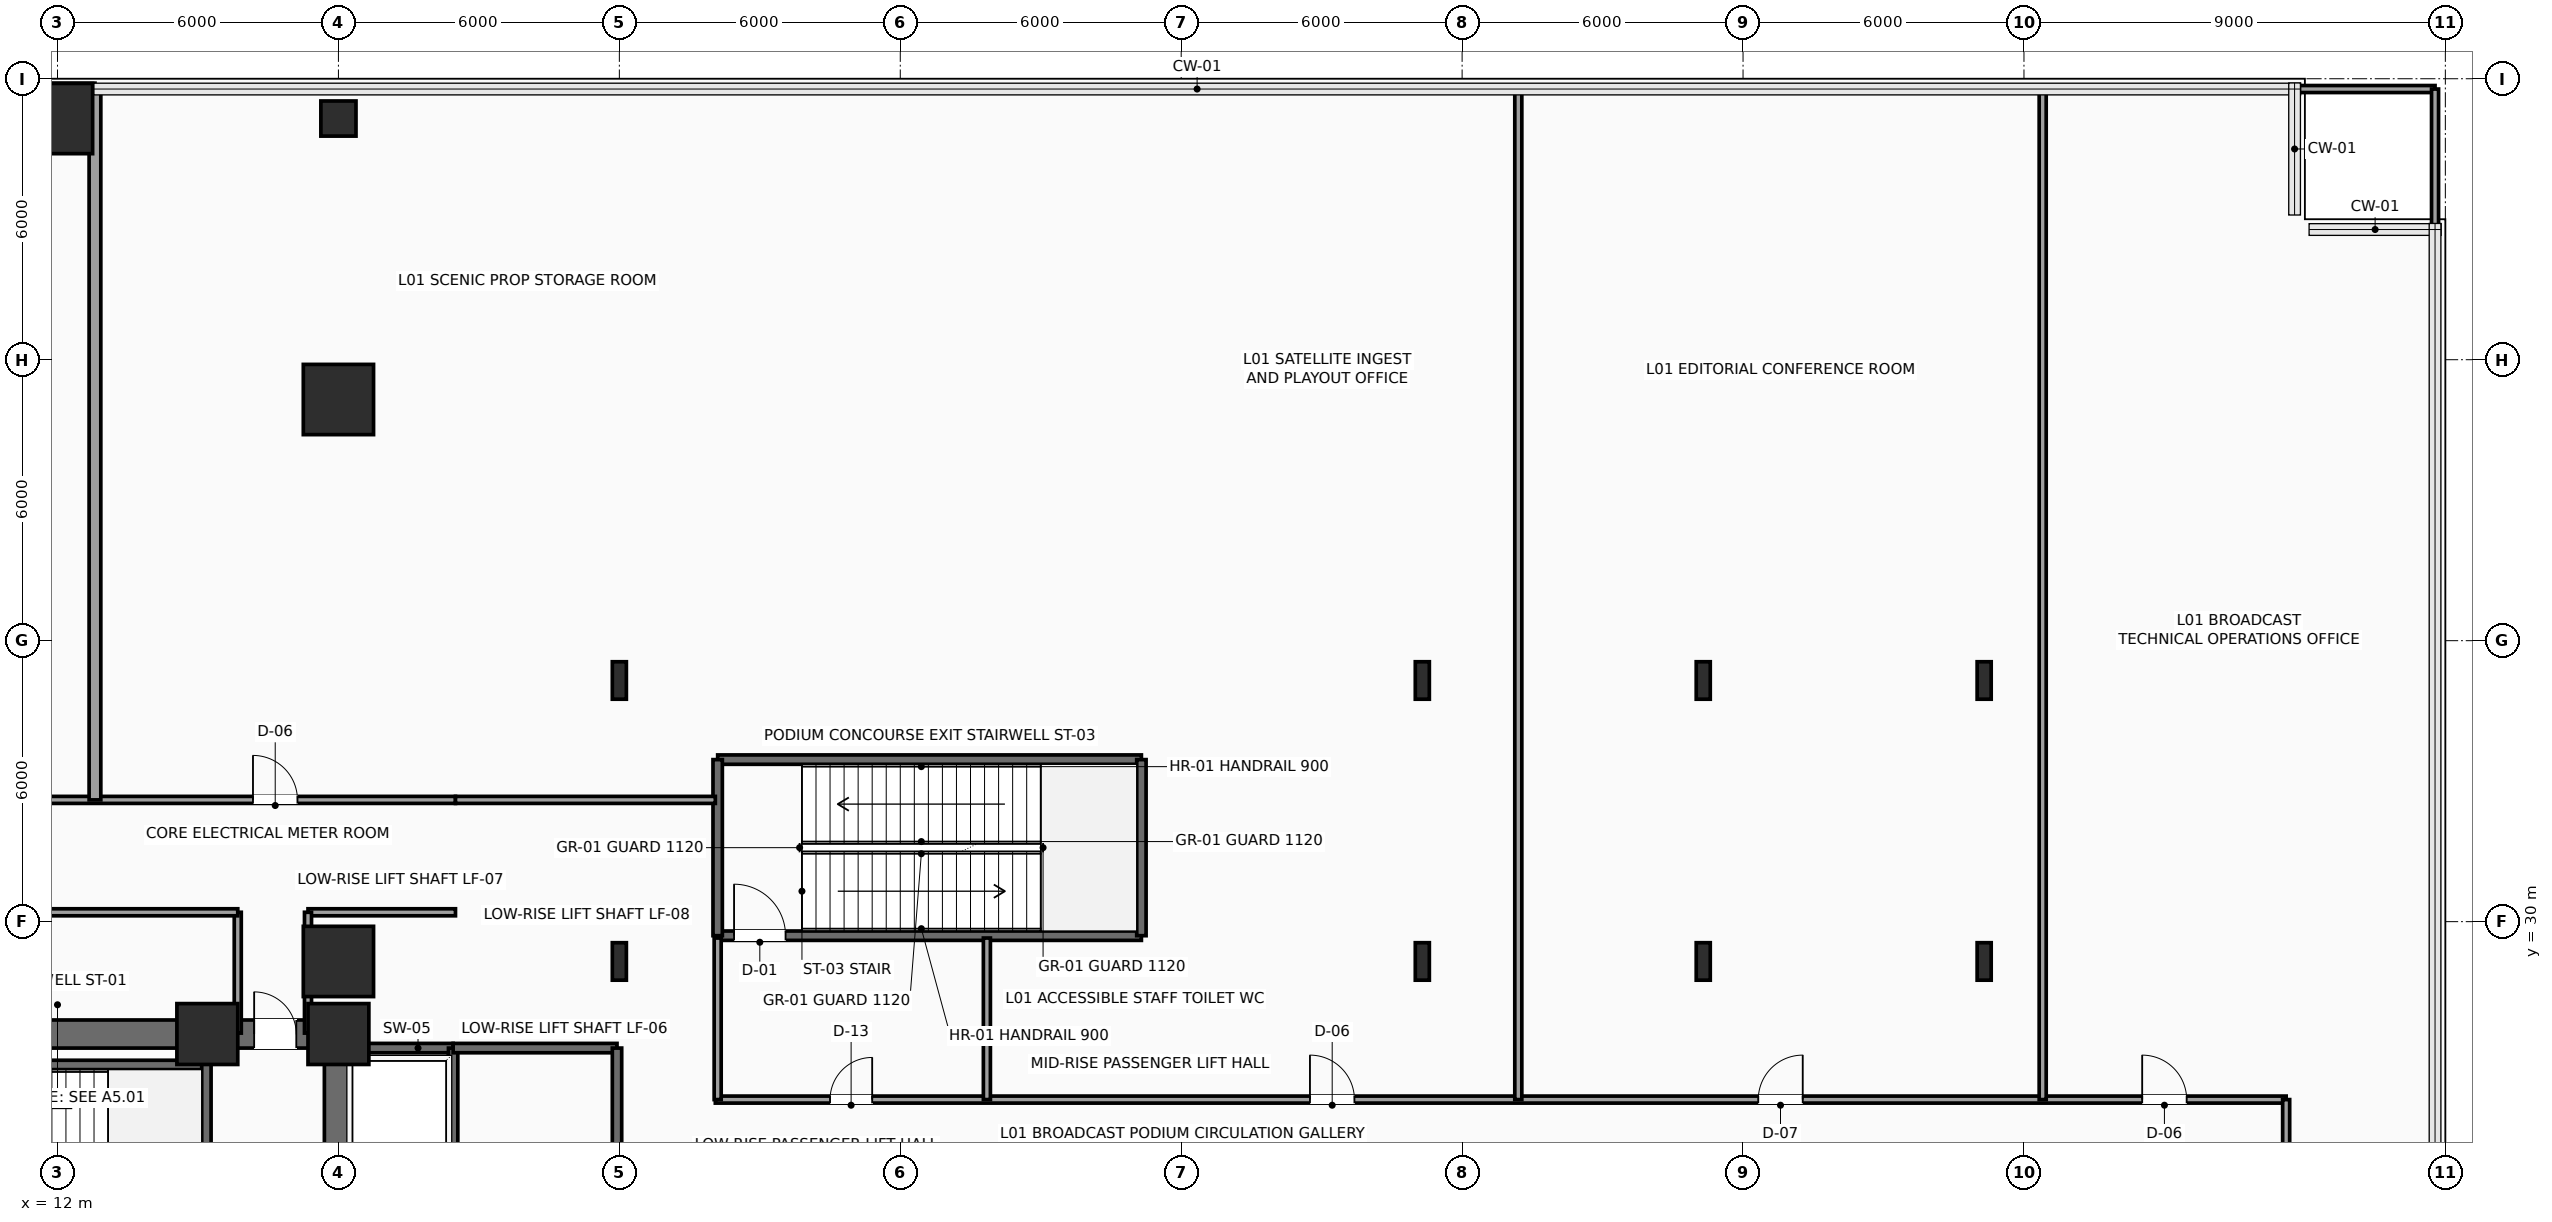
"""IFC4 building model, lengths in metres.
Left out: names, types, materials, properties, quantities, classifications, styles, units other than length and angle.
Written with IfcOpenShell. Run it as: python <this file> out.ifc"""

import sys

from ifc_helpers import new_model, si_unit, direction, frame, frame_2d, origin, origin_2d, place, context, subcontext, project, spatial, rectangle, hollow_rectangle, i_section, extrude, element, fill, save


model = new_model("IFC4")
c1 = context("Model", 3, precision=1e-05, world=origin(), true_north=direction((0.0, 1.0)))
c2 = subcontext(c1, "Body", "Model", "MODEL_VIEW")
j1 = project(units=[si_unit("LENGTHUNIT", "METRE"), si_unit("PLANEANGLEUNIT", "RADIAN")], contexts=[c1])
p1 = place(None, origin())
s1 = spatial("IfcSite", under=j1, at=p1, CompositionType="ELEMENT")
p2 = place(p1, origin())
s2 = spatial("IfcBuilding", under=s1, at=p2, CompositionType="ELEMENT")
p3 = place(p2, frame((0.0, 0.0, 5.7)))
s3 = spatial("IfcBuildingStorey", under=s2, at=p3, CompositionType="ELEMENT", Elevation=5.7)
for number, where, z_axis, x_axis in (
    (1, (15.2, 27.6, 0.0), (0.0, 0.0, 1.0), (1.0, 0.0, 0.0)),
    (2, (18.0, 27.6, 0.0), (0.0, 0.0, 1.0), (1.0, 0.0, 0.0)),
):
    element("IfcColumn", number, at=place(p3, frame(where, z_axis=z_axis, x_axis=x_axis)), inside=s3, PredefinedType="COLUMN", context=c2, shape_type="SweptSolid", body=[
        extrude(rectangle(XDim=1.3, YDim=1.3, at=origin_2d()), origin(), (0.0, 0.0, 1.0), 5.4),
    ])
for number, where, z_axis, x_axis in (
    (3, (12.0, 47.15, 0.0), (0.0, 0.0, 1.0), (1.0, 0.0, 0.0)),
    (4, (18.0, 29.15, 0.0), (0.0, 0.0, 1.0), (1.0, 0.0, 0.0)),
    (5, (18.0, 41.15, 0.0), (0.0, 0.0, 1.0), (1.0, 0.0, 0.0)),
):
    element("IfcColumn", number, at=place(p3, frame(where, z_axis=z_axis, x_axis=x_axis)), inside=s3, PredefinedType="COLUMN", context=c2, shape_type="SweptSolid", body=[
        extrude(rectangle(XDim=1.5, YDim=1.5, at=origin_2d()), origin(), (0.0, 0.0, 1.0), 5.4),
    ])
p4 = place(p3, frame((18.0, 47.15, 0.0), z_axis=(0.0, 0.0, 1.0), x_axis=(1.0, 0.0, 0.0)))
e6 = element("IfcColumn", 6, at=p4, inside=s3, PredefinedType="COLUMN", context=c2, shape_type="SweptSolid", body=[
    extrude(hollow_rectangle(XDim=0.75, YDim=0.75, WallThickness=0.035, InnerFilletRadius=0.035, OuterFilletRadius=0.05, at=origin_2d()), origin(), (0.0, 0.0, 1.0), 5.4),
])
for number, where, z_axis, x_axis in (
    (7, (24.0, 29.15, 0.0), (0.0, 0.0, 1.0), (1.0, 0.0, 0.0)),
    (8, (24.0, 35.15, 0.0), (0.0, 0.0, 1.0), (1.0, 0.0, 0.0)),
    (9, (41.15, 29.15, 0.0), (0.0, 0.0, 1.0), (1.0, 0.0, 0.0)),
    (10, (41.15, 35.15, 0.0), (0.0, 0.0, 1.0), (1.0, 0.0, 0.0)),
    (11, (47.15, 29.15, 0.0), (0.0, 0.0, 1.0), (1.0, 0.0, 0.0)),
    (12, (47.15, 35.15, 0.0), (0.0, 0.0, 1.0), (1.0, 0.0, 0.0)),
    (13, (53.15, 29.15, 0.0), (0.0, 0.0, 1.0), (1.0, 0.0, 0.0)),
    (14, (53.15, 35.15, 0.0), (0.0, 0.0, 1.0), (1.0, 0.0, 0.0)),
):
    element("IfcColumn", number, at=place(p3, frame(where, z_axis=z_axis, x_axis=x_axis)), inside=s3, PredefinedType="COLUMN", context=c2, shape_type="SweptSolid", body=[
        extrude(i_section(OverallWidth=0.3, OverallDepth=0.8, WebThickness=0.018, FlangeThickness=0.033, FilletRadius=0.03, at=origin_2d()), origin(), (0.0, 0.0, 1.0), 5.4),
    ])
p5 = place(p3, frame((6.0, 27.6, 0.0), z_axis=(0.0, 0.0, 1.0), x_axis=(1.0, 0.0, 0.0)))
e15 = element("IfcWall", 15, at=p5, inside=s3, PredefinedType="SHEAR", context=c2, shape_type="SweptSolid", body=[
    extrude(rectangle(XDim=12.0, YDim=0.6, at=frame_2d((6.0, 0.0))), origin(), (0.0, 0.0, 1.0), 5.125),
])
p6 = place(p5, frame((10.2, 0.0, 0.0)))
e16 = element("IfcOpeningElement", 16, at=p6, cuts=e15, PredefinedType="OPENING", context=c2, shape_type="SweptSolid", body=[
    extrude(rectangle(XDim=0.9, YDim=2.15, at=frame_2d((0.45, 1.075))), frame((0.0, 0.31, 0.0), z_axis=(0.0, -1.0, 0.0), x_axis=(1.0, 0.0, 0.0)), (0.0, 0.0, 1.0), 0.62),
])
p7 = place(p3, frame((18.0, 18.0, 0.0), z_axis=(0.0, 0.0, 1.0), x_axis=(0.0, 1.0, 0.0)))
e17 = element("IfcWall", 17, at=p7, inside=s3, PredefinedType="SHEAR", context=c2, shape_type="SweptSolid", body=[
    extrude(rectangle(XDim=9.6, YDim=0.6, at=frame_2d((4.8, 0.0))), origin(), (0.0, 0.0, 1.0), 5.125),
])
p8 = place(p3, frame((6.3, 26.94, 0.0), z_axis=(0.0, 0.0, 1.0), x_axis=(1.0, 0.0, 0.0)))
e18 = element("IfcWall", 18, at=p8, inside=s3, PredefinedType="SHEAR", context=c2, shape_type="SweptSolid", body=[
    extrude(rectangle(XDim=8.88, YDim=0.2, at=frame_2d((4.44, 0.0))), origin(), (0.0, 0.0, 1.0), 5.125),
])
p9 = place(p3, frame((15.18, 23.26, 0.0), z_axis=(0.0, 0.0, 1.0), x_axis=(0.0, 1.0, 0.0)))
e19 = element("IfcWall", 19, at=p9, inside=s3, PredefinedType="SHEAR", context=c2, shape_type="SweptSolid", body=[
    extrude(rectangle(XDim=4.04, YDim=0.2, at=frame_2d((2.02, 0.0))), origin(), (0.0, 0.0, 1.0), 5.125),
])
p10 = place(p3, frame((18.1, 27.3, 0.0), z_axis=(0.0, 0.0, 1.0), x_axis=(1.0, 0.0, 0.0)))
e20 = element("IfcWall", 20, at=p10, inside=s3, PredefinedType="SHEAR", context=c2, shape_type="SweptSolid", body=[
    extrude(rectangle(XDim=2.35, YDim=0.2, at=frame_2d((1.175, 0.0))), origin(), (0.0, 0.0, 1.0), 5.125),
])
p11 = place(p3, frame((20.45, 18.25, 0.0), z_axis=(0.0, 0.0, 1.0), x_axis=(0.0, 1.0, 0.0)))
e21 = element("IfcWall", 21, at=p11, inside=s3, PredefinedType="SHEAR", context=c2, shape_type="SweptSolid", body=[
    extrude(rectangle(XDim=9.05, YDim=0.2, at=frame_2d((4.525, 0.0))), origin(), (0.0, 0.0, 1.0), 5.125),
])
p12 = place(p3, frame((20.45, 27.3, 0.0), z_axis=(0.0, 0.0, 1.0), x_axis=(1.0, 0.0, 0.0)))
e22 = element("IfcWall", 22, at=p12, inside=s3, PredefinedType="SHEAR", context=c2, shape_type="SweptSolid", body=[
    extrude(rectangle(XDim=3.5, YDim=0.2, at=frame_2d((1.75, 0.0))), origin(), (0.0, 0.0, 1.0), 5.125),
])
p13 = place(p3, frame((23.95, 18.0, 0.0), z_axis=(0.0, 0.0, 1.0), x_axis=(0.0, 1.0, 0.0)))
e23 = element("IfcWall", 23, at=p13, inside=s3, PredefinedType="SHEAR", context=c2, shape_type="SweptSolid", body=[
    extrude(rectangle(XDim=9.3, YDim=0.2, at=frame_2d((4.65, 0.0))), origin(), (0.0, 0.0, 1.0), 5.125),
])
p14 = place(p3, frame((26.1, 29.7, 0.0), z_axis=(0.0, 0.0, 1.0), x_axis=(1.0, 0.0, 0.0)))
e24 = element("IfcWall", 24, at=p14, inside=s3, PredefinedType="SHEAR", context=c2, shape_type="SweptSolid", body=[
    extrude(rectangle(XDim=9.05, YDim=0.2, at=frame_2d((4.525, 0.0))), origin(), (0.0, 0.0, 1.0), 5.125),
])
p15 = place(p14, frame((0.35, 0.0, 0.0)))
e25 = element("IfcOpeningElement", 25, at=p15, cuts=e24, PredefinedType="OPENING", context=c2, shape_type="SweptSolid", body=[
    extrude(rectangle(XDim=1.1, YDim=2.2, at=frame_2d((0.55, 1.1))), frame((0.0, 0.11, 0.0), z_axis=(0.0, -1.0, 0.0), x_axis=(1.0, 0.0, 0.0)), (0.0, 0.0, 1.0), 0.22),
])
p16 = place(p3, frame((26.1, 33.46, 0.0), z_axis=(0.0, 0.0, 1.0), x_axis=(1.0, 0.0, 0.0)))
e26 = element("IfcWall", 26, at=p16, inside=s3, PredefinedType="SHEAR", context=c2, shape_type="SweptSolid", body=[
    extrude(rectangle(XDim=9.05, YDim=0.2, at=frame_2d((4.525, 0.0))), origin(), (0.0, 0.0, 1.0), 5.125),
])
for number, where, z_axis, x_axis in (
    (27, (26.1, 29.7, 0.0), (0.0, 0.0, 1.0), (0.0, 1.0, 0.0)),
    (28, (35.15, 29.7, 0.0), (0.0, 0.0, 1.0), (0.0, 1.0, 0.0)),
):
    element("IfcWall", number, at=place(p3, frame(where, z_axis=z_axis, x_axis=x_axis)), inside=s3, PredefinedType="SHEAR", context=c2, shape_type="SweptSolid", body=[
        extrude(rectangle(XDim=3.76, YDim=0.2, at=frame_2d((1.88, 0.0))), origin(), (0.0, 0.0, 1.0), 5.125),
    ])
p17 = place(p3, frame((20.5, 30.2, 0.0), z_axis=(0.0, 0.0, 1.0), x_axis=(-1.0, 0.0, 0.0)))
e29 = element("IfcWall", 29, at=p17, inside=s3, PredefinedType="PARTITIONING", context=c2, shape_type="SweptSolid", body=[
    extrude(rectangle(XDim=3.15, YDim=0.15, at=frame_2d((1.575, 0.0))), origin(), (0.0, 0.0, 1.0), 5.125),
])
for number, where, z_axis, x_axis in (
    (30, (17.35, 30.2, 0.0), (0.0, 0.0, 1.0), (0.0, -1.0, 0.0)),
    (31, (15.85, 27.62, 0.0), (0.0, 0.0, 1.0), (0.0, 1.0, 0.0)),
):
    element("IfcWall", number, at=place(p3, frame(where, z_axis=z_axis, x_axis=x_axis)), inside=s3, PredefinedType="PARTITIONING", context=c2, shape_type="SweptSolid", body=[
        extrude(rectangle(XDim=2.58, YDim=0.15, at=frame_2d((1.29, 0.0))), origin(), (0.0, 0.0, 1.0), 5.125),
    ])
p18 = place(p3, frame((15.85, 30.2, 0.0), z_axis=(0.0, 0.0, 1.0), x_axis=(-1.0, 0.0, 0.0)))
e32 = element("IfcWall", 32, at=p18, inside=s3, PredefinedType="PARTITIONING", context=c2, shape_type="SweptSolid", body=[
    extrude(rectangle(XDim=9.95, YDim=0.15, at=frame_2d((4.975, 0.0))), origin(), (0.0, 0.0, 1.0), 5.125),
])
p19 = place(p3, frame((5.9, 32.6, 0.0), z_axis=(0.0, 0.0, 1.0), x_axis=(1.0, 0.0, 0.0)))
e33 = element("IfcWall", 33, at=p19, inside=s3, PredefinedType="PARTITIONING", context=c2, shape_type="SweptSolid", body=[
    extrude(rectangle(XDim=14.6, YDim=0.15, at=frame_2d((7.3, 0.0))), origin(), (0.0, 0.0, 1.0), 5.125),
])
p20 = place(p19, frame((2.95, 0.0, 0.0)))
e34 = element("IfcOpeningElement", 34, at=p20, cuts=e33, PredefinedType="OPENING", context=c2, shape_type="SweptSolid", body=[
    extrude(rectangle(XDim=1.1, YDim=2.25, at=frame_2d((0.55, 1.125))), frame((0.0, 0.085, 0.0), z_axis=(0.0, -1.0, 0.0), x_axis=(1.0, 0.0, 0.0)), (0.0, 0.0, 1.0), 0.17),
])
p21 = place(p19, frame((10.275, 0.0, 0.0)))
e35 = element("IfcOpeningElement", 35, at=p21, cuts=e33, PredefinedType="OPENING", context=c2, shape_type="SweptSolid", body=[
    extrude(rectangle(XDim=0.95, YDim=2.15, at=frame_2d((0.475, 1.075))), frame((0.0, 0.085, 0.0), z_axis=(0.0, -1.0, 0.0), x_axis=(1.0, 0.0, 0.0)), (0.0, 0.0, 1.0), 0.17),
])
p22 = place(p3, frame((20.5, 32.6, 0.0), z_axis=(0.0, 0.0, 1.0), x_axis=(1.0, 0.0, 0.0)))
e36 = element("IfcWall", 36, at=p22, inside=s3, PredefinedType="PARTITIONING", context=c2, shape_type="SweptSolid", body=[
    extrude(rectangle(XDim=5.55, YDim=0.15, at=frame_2d((2.775, 0.0))), origin(), (0.0, 0.0, 1.0), 5.125),
])
p23 = place(p3, frame((26.05, 26.2, 0.0), z_axis=(0.0, 0.0, 1.0), x_axis=(1.0, 0.0, 0.0)))
e37 = element("IfcWall", 37, at=p23, inside=s3, PredefinedType="PARTITIONING", context=c2, shape_type="SweptSolid", body=[
    extrude(rectangle(XDim=33.55, YDim=0.15, at=frame_2d((16.775, 0.0))), origin(), (0.0, 0.0, 1.0), 5.125),
])
p24 = place(p23, frame((2.45, 0.0, 0.0)))
e38 = element("IfcOpeningElement", 38, at=p24, cuts=e37, PredefinedType="OPENING", context=c2, shape_type="SweptSolid", body=[
    extrude(rectangle(XDim=0.9, YDim=2.1, at=frame_2d((0.45, 1.05))), frame((0.0, 0.085, 0.0), z_axis=(0.0, -1.0, 0.0), x_axis=(1.0, 0.0, 0.0)), (0.0, 0.0, 1.0), 0.17),
])
p25 = place(p23, frame((12.7, 0.0, 0.0)))
e39 = element("IfcOpeningElement", 39, at=p25, cuts=e37, PredefinedType="OPENING", context=c2, shape_type="SweptSolid", body=[
    extrude(rectangle(XDim=0.95, YDim=2.15, at=frame_2d((0.475, 1.075))), frame((0.0, 0.085, 0.0), z_axis=(0.0, -1.0, 0.0), x_axis=(1.0, 0.0, 0.0)), (0.0, 0.0, 1.0), 0.17),
])
p26 = place(p23, frame((22.275, 0.0, 0.0)))
e40 = element("IfcOpeningElement", 40, at=p26, cuts=e37, PredefinedType="OPENING", context=c2, shape_type="SweptSolid", body=[
    extrude(rectangle(XDim=0.95, YDim=2.15, at=frame_2d((0.475, 1.075))), frame((0.0, 0.085, 0.0), z_axis=(0.0, -1.0, 0.0), x_axis=(1.0, 0.0, 0.0)), (0.0, 0.0, 1.0), 0.17),
])
p27 = place(p23, frame((30.475, 0.0, 0.0)))
e41 = element("IfcOpeningElement", 41, at=p27, cuts=e37, PredefinedType="OPENING", context=c2, shape_type="SweptSolid", body=[
    extrude(rectangle(XDim=0.95, YDim=2.15, at=frame_2d((0.475, 1.075))), frame((0.0, 0.085, 0.0), z_axis=(0.0, -1.0, 0.0), x_axis=(1.0, 0.0, 0.0)), (0.0, 0.0, 1.0), 0.17),
])
p28 = place(p3, frame((59.6, 26.2, 0.0), z_axis=(0.0, 0.0, 1.0), x_axis=(0.0, -1.0, 0.0)))
e42 = element("IfcWall", 42, at=p28, inside=s3, PredefinedType="PARTITIONING", context=c2, shape_type="SweptSolid", body=[
    extrude(rectangle(XDim=2.56, YDim=0.15, at=frame_2d((1.28, 0.0))), origin(), (0.0, 0.0, 1.0), 5.125),
])
for number, where, z_axis, x_axis in (
    (43, (26.1, 26.2, 0.0), (0.0, 0.0, 1.0), (0.0, 1.0, 0.0)),
    (44, (31.85, 26.2, 0.0), (0.0, 0.0, 1.0), (0.0, 1.0, 0.0)),
):
    element("IfcWall", number, at=place(p3, frame(where, z_axis=z_axis, x_axis=x_axis)), inside=s3, PredefinedType="PARTITIONING", context=c2, shape_type="SweptSolid", body=[
        extrude(rectangle(XDim=3.45, YDim=0.15, at=frame_2d((1.725, 0.0))), origin(), (0.0, 0.0, 1.0), 5.125),
    ])
for number, where, z_axis, x_axis in (
    (45, (43.2, 26.2, 0.0), (0.0, 0.0, 1.0), (0.0, 1.0, 0.0)),
    (46, (54.4, 26.2, 0.0), (0.0, 0.0, 1.0), (0.0, 1.0, 0.0)),
):
    element("IfcWall", number, at=place(p3, frame(where, z_axis=z_axis, x_axis=x_axis)), inside=s3, PredefinedType="PARTITIONING", context=c2, shape_type="SweptSolid", body=[
        extrude(rectangle(XDim=21.58, YDim=0.15, at=frame_2d((10.79, 0.0))), origin(), (0.0, 0.0, 1.0), 5.125),
    ])
p29 = place(p3, frame((54.4, 47.78, 0.0), z_axis=(0.0, 0.0, 1.0), x_axis=(1.0, 0.0, 0.0)))
e47 = element("IfcWall", 47, at=p29, inside=s3, PredefinedType="PARTITIONING", context=c2, shape_type="SweptSolid", body=[
    extrude(rectangle(XDim=8.38, YDim=0.15, at=frame_2d((4.19, 0.0))), origin(), (0.0, 0.0, 1.0), 5.125),
])
p30 = place(p3, frame((62.78, 26.2, 0.0), z_axis=(0.0, 0.0, 1.0), x_axis=(0.0, 1.0, 0.0)))
e48 = element("IfcWall", 48, at=p30, inside=s3, PredefinedType="PARTITIONING", context=c2, shape_type="SweptSolid", body=[
    extrude(rectangle(XDim=21.58, YDim=0.15, at=frame_2d((10.79, 0.0))), origin(), (0.0, 0.0, 1.0), 5.125),
])
p31 = place(p3, frame((0.22, 47.78, 0.0), z_axis=(0.0, 0.0, 1.0), x_axis=(1.0, 0.0, 0.0)))
e49 = element("IfcWall", 49, at=p31, inside=s3, PredefinedType="PARTITIONING", context=c2, shape_type="SweptSolid", body=[
    extrude(rectangle(XDim=12.58, YDim=0.25, at=frame_2d((6.29, 0.0))), origin(), (0.0, 0.0, 1.0), 5.125),
])
p32 = place(p3, frame((12.8, 32.6, 0.0), z_axis=(0.0, 0.0, 1.0), x_axis=(0.0, 1.0, 0.0)))
e50 = element("IfcWall", 50, at=p32, inside=s3, PredefinedType="PARTITIONING", context=c2, shape_type="SweptSolid", body=[
    extrude(rectangle(XDim=15.18, YDim=0.25, at=frame_2d((7.59, 0.0))), origin(), (0.0, 0.0, 1.0), 5.125),
])
p33 = place(p6, origin())
e51 = element("IfcDoor", 51, at=p33, inside=s3, OperationType="SINGLE_SWING_LEFT", PredefinedType="DOOR", context=c2, shape_type="SweptSolid", body=[
    extrude(rectangle(XDim=0.9, YDim=2.15, at=frame_2d((0.45, 1.075))), frame((0.0, 0.025, 0.0), z_axis=(0.0, -1.0, 0.0), x_axis=(1.0, 0.0, 0.0)), (0.0, 0.0, 1.0), 0.05),
])
fill(e16, e51)
p34 = place(p15, origin())
e52 = element("IfcDoor", 52, at=p34, inside=s3, OperationType="SINGLE_SWING_LEFT", PredefinedType="DOOR", context=c2, shape_type="SweptSolid", body=[
    extrude(rectangle(XDim=1.1, YDim=2.2, at=frame_2d((0.55, 1.1))), frame((0.0, 0.025, 0.0), z_axis=(0.0, -1.0, 0.0), x_axis=(1.0, 0.0, 0.0)), (0.0, 0.0, 1.0), 0.05),
])
fill(e25, e52)
p35 = place(p21, origin())
e53 = element("IfcDoor", 53, at=p35, inside=s3, OperationType="SINGLE_SWING_LEFT", PredefinedType="DOOR", context=c2, shape_type="SweptSolid", body=[
    extrude(rectangle(XDim=0.95, YDim=2.15, at=frame_2d((0.475, 1.075))), frame((0.0, 0.025, 0.0), z_axis=(0.0, -1.0, 0.0), x_axis=(1.0, 0.0, 0.0)), (0.0, 0.0, 1.0), 0.05),
])
fill(e35, e53)
p36 = place(p24, origin())
e54 = element("IfcDoor", 54, at=p36, inside=s3, OperationType="SINGLE_SWING_RIGHT", PredefinedType="DOOR", context=c2, shape_type="SweptSolid", body=[
    extrude(rectangle(XDim=0.9, YDim=2.1, at=frame_2d((0.45, 1.05))), frame((0.0, 0.025, 0.0), z_axis=(0.0, -1.0, 0.0), x_axis=(1.0, 0.0, 0.0)), (0.0, 0.0, 1.0), 0.05),
])
fill(e38, e54)
p37 = place(p25, origin())
e55 = element("IfcDoor", 55, at=p37, inside=s3, OperationType="SINGLE_SWING_LEFT", PredefinedType="DOOR", context=c2, shape_type="SweptSolid", body=[
    extrude(rectangle(XDim=0.95, YDim=2.15, at=frame_2d((0.475, 1.075))), frame((0.0, 0.025, 0.0), z_axis=(0.0, -1.0, 0.0), x_axis=(1.0, 0.0, 0.0)), (0.0, 0.0, 1.0), 0.05),
])
fill(e39, e55)
p38 = place(p26, origin())
e56 = element("IfcDoor", 56, at=p38, inside=s3, OperationType="SINGLE_SWING_RIGHT", PredefinedType="DOOR", context=c2, shape_type="SweptSolid", body=[
    extrude(rectangle(XDim=0.95, YDim=2.15, at=frame_2d((0.475, 1.075))), frame((0.0, 0.025, 0.0), z_axis=(0.0, -1.0, 0.0), x_axis=(1.0, 0.0, 0.0)), (0.0, 0.0, 1.0), 0.05),
])
fill(e40, e56)
p39 = place(p27, origin())
e57 = element("IfcDoor", 57, at=p39, inside=s3, OperationType="SINGLE_SWING_LEFT", PredefinedType="DOOR", context=c2, shape_type="SweptSolid", body=[
    extrude(rectangle(XDim=0.95, YDim=2.15, at=frame_2d((0.475, 1.075))), frame((0.0, 0.025, 0.0), z_axis=(0.0, -1.0, 0.0), x_axis=(1.0, 0.0, 0.0)), (0.0, 0.0, 1.0), 0.05),
])
fill(e41, e57)
save(model, sys.argv[1])
